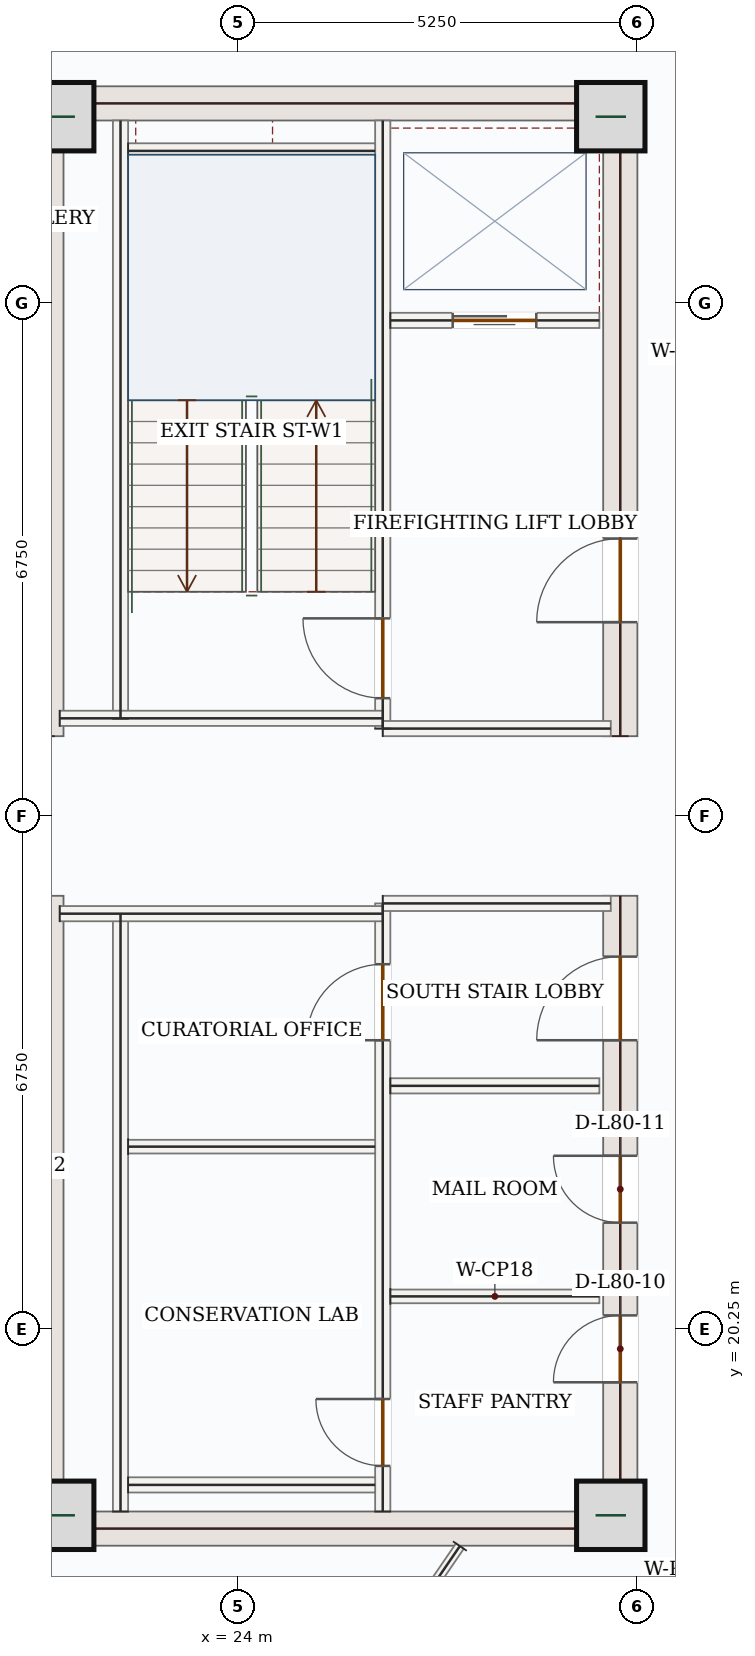
"""IFC4 building model, lengths in metres.
Left out: names, types, materials, properties, quantities, classifications, styles, units other than length and angle.
Written with IfcOpenShell. Run it as: python <this file> out.ifc"""

import sys

from ifc_helpers import new_model, si_unit, direction, frame, frame_2d, origin, origin_2d, place, context, subcontext, project, spatial, rectangle, extrude, source, transform, mapped, element, fill, save


model = new_model("IFC4")
c1 = context("Model", 3, precision=1e-05, world=origin(), true_north=direction((0.0, 1.0)))
c2 = subcontext(c1, "Body", "Model", "MODEL_VIEW")
j1 = project(units=[si_unit("LENGTHUNIT", "METRE"), si_unit("PLANEANGLEUNIT", "RADIAN")], contexts=[c1])
p1 = place(None, origin())
s1 = spatial("IfcSite", under=j1, at=p1, CompositionType="ELEMENT")
p2 = place(p1, origin())
s2 = spatial("IfcBuilding", under=s1, at=p2, CompositionType="ELEMENT")
p3 = place(p2, frame((0.0, 0.0, 331.05)))
s3 = spatial("IfcBuildingStorey", under=s2, at=p3, CompositionType="ELEMENT", Elevation=331.05)
m1 = source(origin(), c2, "Body", "SweptSolid", [
    extrude(rectangle(XDim=8.55, YDim=0.45, at=frame_2d((4.275, 0.0))), origin(), (0.0, 0.0, 1.0), 3.5),
])
for number, where, z_axis, x_axis in (
    (1, (21.475, 17.4, 0.0), (0.0, 0.0, 1.0), (0.0, 1.0, 0.0)),
    (2, (21.475, 28.05, 0.0), (0.0, 0.0, 1.0), (0.0, 1.0, 0.0)),
):
    element("IfcWall", number, at=place(p3, frame(where, z_axis=z_axis, x_axis=x_axis)), inside=s3, PredefinedType="SHEAR", context=c2, shape_type="MappedRepresentation", body=[
        mapped(m1, transform((0.0, 0.0, 0.0), x_axis=(1.0, 0.0, 0.0), y_axis=(0.0, 1.0, 0.0), z_axis=(0.0, 0.0, 1.0), scale=1.0)),
    ])
p4 = place(p3, frame((29.025, 17.4, 0.0), z_axis=(0.0, 0.0, 1.0), x_axis=(0.0, 1.0, 0.0)))
e3 = element("IfcWall", 3, at=p4, inside=s3, PredefinedType="SHEAR", context=c2, shape_type="SweptSolid", body=[
    extrude(rectangle(XDim=8.55, YDim=0.45, at=frame_2d((4.275, 0.0))), origin(), (0.0, 0.0, 1.0), 3.5),
])
p5 = place(p4, frame((6.65, 0.0, 0.0)))
e4 = element("IfcOpeningElement", 4, at=p5, cuts=e3, PredefinedType="OPENING", context=c2, shape_type="SweptSolid", body=[
    extrude(rectangle(XDim=1.1, YDim=2.2, at=frame_2d((0.55, 1.1))), frame((0.0, 0.235, 0.0), z_axis=(0.0, -1.0, 0.0), x_axis=(1.0, 0.0, 0.0)), (0.0, 0.0, 1.0), 0.47),
])
p6 = place(p4, frame((2.15, 0.0, 0.0)))
e5 = element("IfcOpeningElement", 5, at=p6, cuts=e3, PredefinedType="OPENING", context=c2, shape_type="SweptSolid", body=[
    extrude(rectangle(XDim=0.88, YDim=2.1, at=frame_2d((0.44, 1.05))), frame((0.0, 0.235, 0.0), z_axis=(0.0, -1.0, 0.0), x_axis=(1.0, 0.0, 0.0)), (0.0, 0.0, 1.0), 0.47),
])
p7 = place(p4, frame((4.25, 0.0, 0.0)))
e6 = element("IfcOpeningElement", 6, at=p7, cuts=e3, PredefinedType="OPENING", context=c2, shape_type="SweptSolid", body=[
    extrude(rectangle(XDim=0.88, YDim=2.1, at=frame_2d((0.44, 1.05))), frame((0.0, 0.235, 0.0), z_axis=(0.0, -1.0, 0.0), x_axis=(1.0, 0.0, 0.0)), (0.0, 0.0, 1.0), 0.47),
])
p8 = place(p3, frame((29.025, 28.05, 0.0), z_axis=(0.0, 0.0, 1.0), x_axis=(0.0, 1.0, 0.0)))
e7 = element("IfcWall", 7, at=p8, inside=s3, PredefinedType="SHEAR", context=c2, shape_type="SweptSolid", body=[
    extrude(rectangle(XDim=8.55, YDim=0.45, at=frame_2d((4.275, 0.0))), origin(), (0.0, 0.0, 1.0), 3.5),
])
p9 = place(p8, frame((1.5, 0.0, 0.0)))
e8 = element("IfcOpeningElement", 8, at=p9, cuts=e7, PredefinedType="OPENING", context=c2, shape_type="SweptSolid", body=[
    extrude(rectangle(XDim=1.1, YDim=2.2, at=frame_2d((0.55, 1.1))), frame((0.0, 0.235, 0.0), z_axis=(0.0, -1.0, 0.0), x_axis=(1.0, 0.0, 0.0)), (0.0, 0.0, 1.0), 0.47),
])
m2 = source(origin(), c2, "Body", "SweptSolid", [
    extrude(rectangle(XDim=7.1, YDim=0.45, at=frame_2d((3.55, 0.0))), origin(), (0.0, 0.0, 1.0), 3.5),
])
for number, where, z_axis, x_axis in (
    (9, (21.7, 17.625, 0.0), (0.0, 0.0, 1.0), (1.0, 0.0, 0.0)),
    (10, (21.7, 36.375, 0.0), (0.0, 0.0, 1.0), (1.0, 0.0, 0.0)),
):
    element("IfcWall", number, at=place(p3, frame(where, z_axis=z_axis, x_axis=x_axis)), inside=s3, PredefinedType="SHEAR", context=c2, shape_type="MappedRepresentation", body=[
        mapped(m2, transform((0.0, 0.0, 0.0), x_axis=(1.0, 0.0, 0.0), y_axis=(0.0, 1.0, 0.0), z_axis=(0.0, 0.0, 1.0), scale=1.0)),
    ])
m3 = source(origin(), c2, "Body", "SweptSolid", [
    extrude(rectangle(XDim=0.9, YDim=0.9, at=origin_2d()), origin(), (0.0, 0.0, 1.0), 3.75),
])
for number, where, z_axis, x_axis in (
    (11, (21.65, 17.8, 0.0), (0.0, 0.0, 1.0), (1.0, 0.0, 0.0)),
    (12, (28.9, 17.8, 0.0), (0.0, 0.0, 1.0), (1.0, 0.0, 0.0)),
    (13, (21.65, 36.2, 0.0), (0.0, 0.0, 1.0), (1.0, 0.0, 0.0)),
    (14, (28.9, 36.2, 0.0), (0.0, 0.0, 1.0), (1.0, 0.0, 0.0)),
):
    element("IfcColumn", number, at=place(p3, frame(where, z_axis=z_axis, x_axis=x_axis)), inside=s3, PredefinedType="COLUMN", context=c2, shape_type="MappedRepresentation", body=[
        mapped(m3, transform((0.0, 0.0, 0.0), x_axis=(1.0, 0.0, 0.0), y_axis=(0.0, 1.0, 0.0), z_axis=(0.0, 0.0, 1.0), scale=1.0)),
    ])
m4 = source(origin(), c2, "Body", "SweptSolid", [
    extrude(rectangle(XDim=3.709, YDim=0.28, at=frame_2d((1.855, 0.0))), origin(), (0.0, 0.0, 1.0), 3.5),
])
p10 = place(p3, frame((18.94, 35.542, 0.0), z_axis=(0.0, 0.0, 1.0), x_axis=(0.707106781187, 0.707106781187, 0.0)))
e15 = element("IfcWall", 15, at=p10, inside=s3, PredefinedType="SOLIDWALL", context=c2, shape_type="MappedRepresentation", body=[
    mapped(m4, transform((0.0, 0.0, 0.0), x_axis=(1.0, 0.0, 0.0), y_axis=(0.0, 1.0, 0.0), z_axis=(0.0, 0.0, 1.0), scale=1.0)),
])
m5 = source(origin(), c2, "Body", "SweptSolid", [
    extrude(rectangle(XDim=7.87, YDim=0.2, at=frame_2d((3.935, 0.0))), origin(), (0.0, 0.0, 1.0), 3.5),
])
for number, where, z_axis, x_axis in (
    (16, (22.45, 17.85, 0.0), (0.0, 0.0, 1.0), (0.0, 1.0, 0.0)),
    (17, (22.45, 28.28, 0.0), (0.0, 0.0, 1.0), (0.0, 1.0, 0.0)),
):
    element("IfcWall", number, at=place(p3, frame(where, z_axis=z_axis, x_axis=x_axis)), inside=s3, PredefinedType="SOLIDWALL", context=c2, shape_type="MappedRepresentation", body=[
        mapped(m5, transform((0.0, 0.0, 0.0), x_axis=(1.0, 0.0, 0.0), y_axis=(0.0, 1.0, 0.0), z_axis=(0.0, 0.0, 1.0), scale=1.0)),
    ])
p11 = place(p3, frame((25.9, 17.85, 0.0), z_axis=(0.0, 0.0, 1.0), x_axis=(0.0, 1.0, 0.0)))
e18 = element("IfcWall", 18, at=p11, inside=s3, PredefinedType="SOLIDWALL", context=c2, shape_type="SweptSolid", body=[
    extrude(rectangle(XDim=8.0, YDim=0.2, at=frame_2d((4.0, 0.0))), origin(), (0.0, 0.0, 1.0), 3.5),
])
p12 = place(p11, frame((6.2, 0.0, 0.0)))
e19 = element("IfcOpeningElement", 19, at=p12, cuts=e18, PredefinedType="OPENING", context=c2, shape_type="SweptSolid", body=[
    extrude(rectangle(XDim=1.0, YDim=2.15, at=frame_2d((0.5, 1.075))), frame((0.0, 0.11, 0.0), z_axis=(0.0, -1.0, 0.0), x_axis=(1.0, 0.0, 0.0)), (0.0, 0.0, 1.0), 0.22),
])
p13 = place(p11, frame((0.6, 0.0, 0.0)))
e20 = element("IfcOpeningElement", 20, at=p13, cuts=e18, PredefinedType="OPENING", context=c2, shape_type="SweptSolid", body=[
    extrude(rectangle(XDim=0.88, YDim=2.1, at=frame_2d((0.44, 1.05))), frame((0.0, 0.11, 0.0), z_axis=(0.0, -1.0, 0.0), x_axis=(1.0, 0.0, 0.0)), (0.0, 0.0, 1.0), 0.22),
])
p14 = place(p3, frame((25.9, 28.15, 0.0), z_axis=(0.0, 0.0, 1.0), x_axis=(0.0, 1.0, 0.0)))
e21 = element("IfcWall", 21, at=p14, inside=s3, PredefinedType="SOLIDWALL", context=c2, shape_type="SweptSolid", body=[
    extrude(rectangle(XDim=8.0, YDim=0.2, at=frame_2d((4.0, 0.0))), origin(), (0.0, 0.0, 1.0), 3.5),
])
p15 = place(p14, frame((0.4, 0.0, 0.0)))
e22 = element("IfcOpeningElement", 22, at=p15, cuts=e21, PredefinedType="OPENING", context=c2, shape_type="SweptSolid", body=[
    extrude(rectangle(XDim=1.05, YDim=2.15, at=frame_2d((0.525, 1.075))), frame((0.0, 0.11, 0.0), z_axis=(0.0, -1.0, 0.0), x_axis=(1.0, 0.0, 0.0)), (0.0, 0.0, 1.0), 0.22),
])
m6 = source(origin(), c2, "Body", "SweptSolid", [
    extrude(rectangle(XDim=4.25, YDim=0.2, at=frame_2d((2.125, 0.0))), origin(), (0.0, 0.0, 1.0), 3.5),
])
p16 = place(p3, frame((21.65, 25.715, 0.0), z_axis=(0.0, 0.0, 1.0), x_axis=(1.0, 0.0, 0.0)))
e23 = element("IfcWall", 23, at=p16, inside=s3, PredefinedType="SOLIDWALL", context=c2, shape_type="MappedRepresentation", body=[
    mapped(m6, transform((0.0, 0.0, 0.0), x_axis=(1.0, 0.0, 0.0), y_axis=(0.0, 1.0, 0.0), z_axis=(0.0, 0.0, 1.0), scale=1.0)),
])
m7 = source(origin(), c2, "Body", "SweptSolid", [
    extrude(rectangle(XDim=3.0, YDim=0.2, at=frame_2d((1.5, 0.0))), origin(), (0.0, 0.0, 1.0), 3.5),
])
p17 = place(p3, frame((25.9, 25.85, 0.0), z_axis=(0.0, 0.0, 1.0), x_axis=(1.0, 0.0, 0.0)))
e24 = element("IfcWall", 24, at=p17, inside=s3, PredefinedType="SOLIDWALL", context=c2, shape_type="MappedRepresentation", body=[
    mapped(m7, transform((0.0, 0.0, 0.0), x_axis=(1.0, 0.0, 0.0), y_axis=(0.0, 1.0, 0.0), z_axis=(0.0, 0.0, 1.0), scale=1.0)),
])
p18 = place(p3, frame((21.65, 28.285, 0.0), z_axis=(0.0, 0.0, 1.0), x_axis=(1.0, 0.0, 0.0)))
e25 = element("IfcWall", 25, at=p18, inside=s3, PredefinedType="SOLIDWALL", context=c2, shape_type="MappedRepresentation", body=[
    mapped(m6, transform((0.0, 0.0, 0.0), x_axis=(1.0, 0.0, 0.0), y_axis=(0.0, 1.0, 0.0), z_axis=(0.0, 0.0, 1.0), scale=1.0)),
])
p19 = place(p3, frame((25.9, 28.15, 0.0), z_axis=(0.0, 0.0, 1.0), x_axis=(1.0, 0.0, 0.0)))
e26 = element("IfcWall", 26, at=p19, inside=s3, PredefinedType="SOLIDWALL", context=c2, shape_type="MappedRepresentation", body=[
    mapped(m7, transform((0.0, 0.0, 0.0), x_axis=(1.0, 0.0, 0.0), y_axis=(0.0, 1.0, 0.0), z_axis=(0.0, 0.0, 1.0), scale=1.0)),
])
m8 = source(origin(), c2, "Body", "SweptSolid", [
    extrude(rectangle(XDim=3.25, YDim=0.2, at=frame_2d((1.625, 0.0))), origin(), (0.0, 0.0, 1.0), 3.5),
])
for number, where, z_axis, x_axis in (
    (27, (22.55, 35.75, 0.0), (0.0, 0.0, 1.0), (1.0, 0.0, 0.0)),
    (28, (22.55, 18.2, 0.0), (0.0, 0.0, 1.0), (1.0, 0.0, 0.0)),
):
    element("IfcWall", number, at=place(p3, frame(where, z_axis=z_axis, x_axis=x_axis)), inside=s3, PredefinedType="SOLIDWALL", context=c2, shape_type="MappedRepresentation", body=[
        mapped(m8, transform((0.0, 0.0, 0.0), x_axis=(1.0, 0.0, 0.0), y_axis=(0.0, 1.0, 0.0), z_axis=(0.0, 0.0, 1.0), scale=1.0)),
    ])
m9 = source(origin(), c2, "Body", "SweptSolid", [
    extrude(rectangle(XDim=3.25, YDim=0.18, at=frame_2d((1.625, 0.0))), origin(), (0.0, 0.0, 1.0), 3.5),
])
p20 = place(p3, frame((22.55, 22.65, 0.0), z_axis=(0.0, 0.0, 1.0), x_axis=(1.0, 0.0, 0.0)))
e29 = element("IfcWall", 29, at=p20, inside=s3, PredefinedType="PARTITIONING", context=c2, shape_type="MappedRepresentation", body=[
    mapped(m9, transform((0.0, 0.0, 0.0), x_axis=(1.0, 0.0, 0.0), y_axis=(0.0, 1.0, 0.0), z_axis=(0.0, 0.0, 1.0), scale=1.0)),
])
p21 = place(p3, frame((26.0, 33.52, 0.0), z_axis=(0.0, 0.0, 1.0), x_axis=(1.0, 0.0, 0.0)))
e30 = element("IfcWall", 30, at=p21, inside=s3, PredefinedType="SOLIDWALL", context=c2, shape_type="SweptSolid", body=[
    extrude(rectangle(XDim=2.75, YDim=0.2, at=frame_2d((1.375, 0.0))), origin(), (0.0, 0.0, 1.0), 3.5),
])
p22 = place(p21, frame((0.82, 0.0, 0.0)))
e31 = element("IfcOpeningElement", 31, at=p22, cuts=e30, PredefinedType="OPENING", context=c2, shape_type="SweptSolid", body=[
    extrude(rectangle(XDim=1.1, YDim=2.15, at=frame_2d((0.55, 1.075))), frame((0.0, 0.11, 0.0), z_axis=(0.0, -1.0, 0.0), x_axis=(1.0, 0.0, 0.0)), (0.0, 0.0, 1.0), 0.22),
])
m10 = source(origin(), c2, "Body", "SweptSolid", [
    extrude(rectangle(XDim=2.75, YDim=0.2, at=frame_2d((1.375, 0.0))), origin(), (0.0, 0.0, 1.0), 3.5),
])
p23 = place(p3, frame((26.0, 23.45, 0.0), z_axis=(0.0, 0.0, 1.0), x_axis=(1.0, 0.0, 0.0)))
e32 = element("IfcWall", 32, at=p23, inside=s3, PredefinedType="SOLIDWALL", context=c2, shape_type="MappedRepresentation", body=[
    mapped(m10, transform((0.0, 0.0, 0.0), x_axis=(1.0, 0.0, 0.0), y_axis=(0.0, 1.0, 0.0), z_axis=(0.0, 0.0, 1.0), scale=1.0)),
])
m11 = source(origin(), c2, "Body", "SweptSolid", [
    extrude(rectangle(XDim=2.75, YDim=0.18, at=frame_2d((1.375, 0.0))), origin(), (0.0, 0.0, 1.0), 3.5),
])
p24 = place(p3, frame((26.0, 20.68, 0.0), z_axis=(0.0, 0.0, 1.0), x_axis=(1.0, 0.0, 0.0)))
e33 = element("IfcWall", 33, at=p24, inside=s3, PredefinedType="PARTITIONING", context=c2, shape_type="MappedRepresentation", body=[
    mapped(m11, transform((0.0, 0.0, 0.0), x_axis=(1.0, 0.0, 0.0), y_axis=(0.0, 1.0, 0.0), z_axis=(0.0, 0.0, 1.0), scale=1.0)),
])
m12 = source(origin(), c2, "Body", "SweptSolid", [
    extrude(rectangle(XDim=2.511, YDim=0.125, at=frame_2d((1.255, 0.0))), origin(), (0.0, 0.0, 1.0), 3.5),
])
p25 = place(p3, frame((26.915, 17.395, 0.0), z_axis=(0.0, 0.0, 1.0), x_axis=(-0.564980194272, -0.825104466162, 0.0)))
e34 = element("IfcWall", 34, at=p25, inside=s3, PredefinedType="PARTITIONING", context=c2, shape_type="MappedRepresentation", body=[
    mapped(m12, transform((0.0, 0.0, 0.0), x_axis=(1.0, 0.0, 0.0), y_axis=(0.0, 1.0, 0.0), z_axis=(0.0, 0.0, 1.0), scale=1.0)),
])
m13 = source(origin(), c2, "Body", "SweptSolid", [
    extrude(rectangle(XDim=1.05, YDim=2.15, at=frame_2d((0.525, 1.075))), frame((0.0, 0.025, 0.0), z_axis=(0.0, -1.0, 0.0), x_axis=(1.0, 0.0, 0.0)), (0.0, 0.0, 1.0), 0.05),
])
p26 = place(p15, origin())
e35 = element("IfcDoor", 35, at=p26, inside=s3, OperationType="SINGLE_SWING_RIGHT", PredefinedType="DOOR", context=c2, shape_type="MappedRepresentation", body=[
    mapped(m13, transform((0.0, 0.0, 0.0), x_axis=(1.0, 0.0, 0.0), y_axis=(0.0, 1.0, 0.0), z_axis=(0.0, 0.0, 1.0), scale=1.0)),
])
fill(e22, e35)
m14 = source(origin(), c2, "Body", "SweptSolid", [
    extrude(rectangle(XDim=1.0, YDim=2.15, at=frame_2d((0.5, 1.075))), frame((0.0, 0.025, 0.0), z_axis=(0.0, -1.0, 0.0), x_axis=(1.0, 0.0, 0.0)), (0.0, 0.0, 1.0), 0.05),
])
p27 = place(p12, origin())
e36 = element("IfcDoor", 36, at=p27, inside=s3, OperationType="SINGLE_SWING_LEFT", PredefinedType="DOOR", context=c2, shape_type="MappedRepresentation", body=[
    mapped(m14, transform((0.0, 0.0, 0.0), x_axis=(1.0, 0.0, 0.0), y_axis=(0.0, 1.0, 0.0), z_axis=(0.0, 0.0, 1.0), scale=1.0)),
])
fill(e19, e36)
m15 = source(origin(), c2, "Body", "SweptSolid", [
    extrude(rectangle(XDim=0.88, YDim=2.1, at=frame_2d((0.44, 1.05))), frame((0.0, 0.025, 0.0), z_axis=(0.0, -1.0, 0.0), x_axis=(1.0, 0.0, 0.0)), (0.0, 0.0, 1.0), 0.05),
])
p28 = place(p13, origin())
e37 = element("IfcDoor", 37, at=p28, inside=s3, OperationType="SINGLE_SWING_RIGHT", PredefinedType="DOOR", context=c2, shape_type="MappedRepresentation", body=[
    mapped(m15, transform((0.0, 0.0, 0.0), x_axis=(1.0, 0.0, 0.0), y_axis=(0.0, 1.0, 0.0), z_axis=(0.0, 0.0, 1.0), scale=1.0)),
])
fill(e20, e37)
m16 = source(origin(), c2, "Body", "SweptSolid", [
    extrude(rectangle(XDim=1.1, YDim=2.15, at=frame_2d((0.55, 1.075))), frame((0.0, 0.025, 0.0), z_axis=(0.0, -1.0, 0.0), x_axis=(1.0, 0.0, 0.0)), (0.0, 0.0, 1.0), 0.05),
])
p29 = place(p22, origin())
e38 = element("IfcDoor", 38, at=p29, inside=s3, OperationType="DOUBLE_DOOR_SLIDING", PredefinedType="DOOR", context=c2, shape_type="MappedRepresentation", body=[
    mapped(m16, transform((0.0, 0.0, 0.0), x_axis=(1.0, 0.0, 0.0), y_axis=(0.0, 1.0, 0.0), z_axis=(0.0, 0.0, 1.0), scale=1.0)),
])
fill(e31, e38)
m17 = source(origin(), c2, "Body", "SweptSolid", [
    extrude(rectangle(XDim=1.1, YDim=2.2, at=frame_2d((0.55, 1.1))), frame((0.0, 0.025, 0.0), z_axis=(0.0, -1.0, 0.0), x_axis=(1.0, 0.0, 0.0)), (0.0, 0.0, 1.0), 0.05),
])
p30 = place(p9, origin())
e39 = element("IfcDoor", 39, at=p30, inside=s3, OperationType="SINGLE_SWING_LEFT", PredefinedType="DOOR", context=c2, shape_type="MappedRepresentation", body=[
    mapped(m17, transform((0.0, 0.0, 0.0), x_axis=(1.0, 0.0, 0.0), y_axis=(0.0, 1.0, 0.0), z_axis=(0.0, 0.0, 1.0), scale=1.0)),
])
fill(e8, e39)
p31 = place(p5, origin())
e40 = element("IfcDoor", 40, at=p31, inside=s3, OperationType="SINGLE_SWING_LEFT", PredefinedType="DOOR", context=c2, shape_type="MappedRepresentation", body=[
    mapped(m17, transform((0.0, 0.0, 0.0), x_axis=(1.0, 0.0, 0.0), y_axis=(0.0, 1.0, 0.0), z_axis=(0.0, 0.0, 1.0), scale=1.0)),
])
fill(e4, e40)
p32 = place(p6, origin())
e41 = element("IfcDoor", 41, at=p32, inside=s3, OperationType="SINGLE_SWING_LEFT", PredefinedType="DOOR", context=c2, shape_type="MappedRepresentation", body=[
    mapped(m15, transform((0.0, 0.0, 0.0), x_axis=(1.0, 0.0, 0.0), y_axis=(0.0, 1.0, 0.0), z_axis=(0.0, 0.0, 1.0), scale=1.0)),
])
fill(e5, e41)
p33 = place(p7, origin())
e42 = element("IfcDoor", 42, at=p33, inside=s3, OperationType="SINGLE_SWING_RIGHT", PredefinedType="DOOR", context=c2, shape_type="MappedRepresentation", body=[
    mapped(m15, transform((0.0, 0.0, 0.0), x_axis=(1.0, 0.0, 0.0), y_axis=(0.0, 1.0, 0.0), z_axis=(0.0, 0.0, 1.0), scale=1.0)),
])
fill(e6, e42)
save(model, sys.argv[1])
